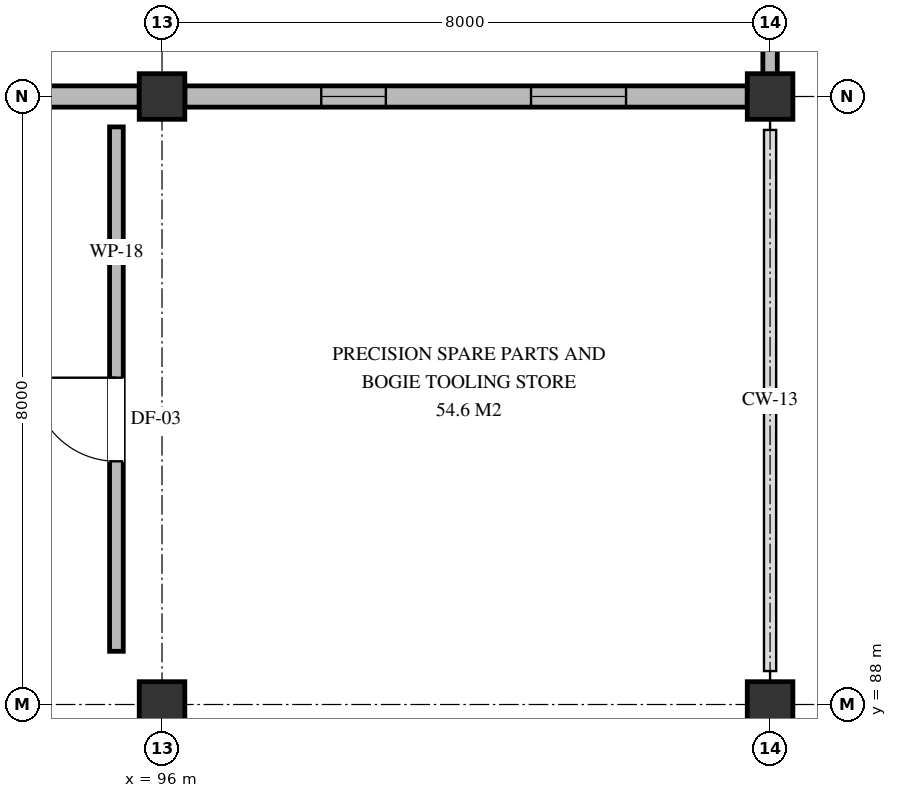
"""IFC4 building model, lengths in metres.
Left out: names, types, materials, properties, quantities, classifications, styles, units other than length and angle.
Written with IfcOpenShell. Run it as: python <this file> out.ifc"""

import sys

from ifc_helpers import new_model, si_unit, direction, frame, frame_2d, origin, origin_2d, place, context, subcontext, project, spatial, polyline, rectangle, outline, extrude, element, fill, save


model = new_model("IFC4")
c1 = context("Model", 3, precision=1e-05, world=origin(), true_north=direction((0.0, 1.0)))
c2 = subcontext(c1, "Body", "Model", "MODEL_VIEW")
j1 = project(units=[si_unit("LENGTHUNIT", "METRE"), si_unit("PLANEANGLEUNIT", "RADIAN")], contexts=[c1])
p1 = place(None, origin())
s1 = spatial("IfcSite", under=j1, at=p1, CompositionType="ELEMENT")
p2 = place(p1, origin())
s2 = spatial("IfcBuilding", under=s1, at=p2, CompositionType="ELEMENT")
p3 = place(p2, frame((0.0, 0.0, 4.8)))
s3 = spatial("IfcBuildingStorey", under=s2, at=p3, CompositionType="ELEMENT", Elevation=4.8)
for number, where, z_axis, x_axis in (
    (1, (96.0, 88.0, 0.0), (0.0, 0.0, 1.0), (1.0, 0.0, 0.0)),
    (2, (96.0, 96.0, 0.0), (0.0, 0.0, 1.0), (1.0, 0.0, 0.0)),
    (3, (104.0, 88.0, 0.0), (0.0, 0.0, 1.0), (1.0, 0.0, 0.0)),
    (4, (104.0, 96.0, 0.0), (0.0, 0.0, 1.0), (1.0, 0.0, 0.0)),
):
    element("IfcColumn", number, at=place(p3, frame(where, z_axis=z_axis, x_axis=x_axis)), inside=s3, PredefinedType="COLUMN", context=c2, shape_type="SweptSolid", body=[
        extrude(rectangle(XDim=0.6, YDim=0.6, at=origin_2d()), origin(), (0.0, 0.0, 1.0), 4.8),
    ])
p4 = place(p3, frame((80.3, 96.0, 0.0), z_axis=(0.0, 0.0, 1.0), x_axis=(1.0, 0.0, 0.0)))
e5 = element("IfcWall", 5, at=p4, inside=s3, PredefinedType="STANDARD", context=c2, shape_type="SweptSolid", body=[
    extrude(rectangle(XDim=15.4, YDim=0.28, at=frame_2d((7.7, 0.0))), origin(), (0.0, 0.0, 1.0), 3.6),
])
p5 = place(p4, frame((3.146, 0.0, 0.78)))
e6 = element("IfcOpeningElement", 6, at=p5, cuts=e5, PredefinedType="OPENING", context=c2, shape_type="SweptSolid", body=[
    extrude(rectangle(XDim=1.1, YDim=2.2, at=frame_2d((0.55, 1.1))), frame((0.0, 0.15, 0.0), z_axis=(0.0, -1.0, 0.0), x_axis=(1.0, 0.0, 0.0)), (0.0, 0.0, 1.0), 0.3),
])
p6 = place(p4, frame((7.2, 0.0, 0.78)))
e7 = element("IfcOpeningElement", 7, at=p6, cuts=e5, PredefinedType="OPENING", context=c2, shape_type="SweptSolid", body=[
    extrude(rectangle(XDim=1.0, YDim=1.9, at=frame_2d((0.5, 0.95))), frame((0.0, 0.15, 0.0), z_axis=(0.0, -1.0, 0.0), x_axis=(1.0, 0.0, 0.0)), (0.0, 0.0, 1.0), 0.3),
])
p7 = place(p4, frame((11.229, 0.0, 0.78)))
e8 = element("IfcOpeningElement", 8, at=p7, cuts=e5, PredefinedType="OPENING", context=c2, shape_type="SweptSolid", body=[
    extrude(rectangle(XDim=0.95, YDim=2.6, at=frame_2d((0.475, 1.3))), frame((0.0, 0.15, 0.0), z_axis=(0.0, -1.0, 0.0), x_axis=(1.0, 0.0, 0.0)), (0.0, 0.0, 1.0), 0.3),
])
p8 = place(p3, frame((96.3, 96.0, 0.0), z_axis=(0.0, 0.0, 1.0), x_axis=(1.0, 0.0, 0.0)))
e9 = element("IfcWall", 9, at=p8, inside=s3, PredefinedType="STANDARD", context=c2, shape_type="SweptSolid", body=[
    extrude(rectangle(XDim=7.4, YDim=0.28, at=frame_2d((3.7, 0.0))), origin(), (0.0, 0.0, 1.0), 3.85),
])
p9 = place(p8, frame((1.795, 0.0, 0.78)))
e10 = element("IfcOpeningElement", 10, at=p9, cuts=e9, PredefinedType="OPENING", context=c2, shape_type="SweptSolid", body=[
    extrude(rectangle(XDim=0.85, YDim=2.4, at=frame_2d((0.425, 1.2))), frame((0.0, 0.15, 0.0), z_axis=(0.0, -1.0, 0.0), x_axis=(1.0, 0.0, 0.0)), (0.0, 0.0, 1.0), 0.3),
])
p10 = place(p8, frame((4.555, 0.0, 0.78)))
e11 = element("IfcOpeningElement", 11, at=p10, cuts=e9, PredefinedType="OPENING", context=c2, shape_type="SweptSolid", body=[
    extrude(rectangle(XDim=1.25, YDim=2.15, at=frame_2d((0.625, 1.075))), frame((0.0, 0.15, 0.0), z_axis=(0.0, -1.0, 0.0), x_axis=(1.0, 0.0, 0.0)), (0.0, 0.0, 1.0), 0.3),
])
p11 = place(p3, frame((104.0, 116.0, 0.06), z_axis=(0.0, 0.0, 1.0), x_axis=(0.0, -1.0, 0.0)))
e12 = element("IfcWall", 12, at=p11, inside=s3, PredefinedType="PARAPET", context=c2, shape_type="SweptSolid", body=[
    extrude(outline(polyline([(0.0, 0.0), (19.8, 0.0), (19.8, 1.49), (18.701, 1.49), (18.691, 0.94), (16.959, 0.94), (16.949, 1.49), (15.84, 1.49), (15.83, 1.49), (14.741, 1.49), (14.731, 0.94), (12.999, 0.94), (12.989, 1.49), (11.88, 1.49), (11.87, 1.49), (10.781, 1.49), (10.771, 0.94), (9.039, 0.94), (9.029, 1.49), (7.92, 1.49), (7.91, 1.49), (6.821, 1.49), (6.811, 0.94), (5.079, 0.94), (5.069, 1.49), (3.96, 1.49), (3.95, 1.49), (2.861, 1.49), (2.851, 0.94), (1.119, 0.94), (1.109, 1.49), (0.0, 1.49), (0.0, 0.0)])), frame((0.0, 0.095, 0.0), z_axis=(0.0, -1.0, 0.0), x_axis=(1.0, 0.0, 0.0)), (0.0, 0.0, 1.0), 0.19),
])
p12 = place(p3, frame((95.4, 88.7, 0.0), z_axis=(0.0, 0.0, 1.0), x_axis=(0.0, 1.0, 0.0)))
e13 = element("IfcWall", 13, at=p12, inside=s3, PredefinedType="PARTITIONING", context=c2, shape_type="SweptSolid", body=[
    extrude(rectangle(XDim=6.9, YDim=0.18, at=frame_2d((3.45, 0.0))), origin(), (0.0, 0.0, 1.0), 3.592),
])
p13 = place(p12, frame((2.5, 0.0, 0.0)))
e14 = element("IfcOpeningElement", 14, at=p13, cuts=e13, PredefinedType="OPENING", context=c2, shape_type="SweptSolid", body=[
    extrude(rectangle(XDim=1.1, YDim=2.2, at=frame_2d((0.55, 1.1))), frame((0.0, 0.1, 0.0), z_axis=(0.0, -1.0, 0.0), x_axis=(1.0, 0.0, 0.0)), (0.0, 0.0, 1.0), 0.2),
])
p14 = place(p9, origin())
e15 = element("IfcWindow", 15, at=p14, inside=s3, PartitioningType="SINGLE_PANEL", PredefinedType="WINDOW", context=c2, shape_type="SweptSolid", body=[
    extrude(rectangle(XDim=0.85, YDim=2.4, at=frame_2d((0.425, 1.2))), frame((0.0, 0.03, 0.0), z_axis=(0.0, -1.0, 0.0), x_axis=(1.0, 0.0, 0.0)), (0.0, 0.0, 1.0), 0.06),
])
fill(e10, e15)
p15 = place(p10, origin())
e16 = element("IfcWindow", 16, at=p15, inside=s3, PartitioningType="SINGLE_PANEL", PredefinedType="WINDOW", context=c2, shape_type="SweptSolid", body=[
    extrude(rectangle(XDim=1.25, YDim=2.15, at=frame_2d((0.625, 1.075))), frame((0.0, 0.03, 0.0), z_axis=(0.0, -1.0, 0.0), x_axis=(1.0, 0.0, 0.0)), (0.0, 0.0, 1.0), 0.06),
])
fill(e11, e16)
p16 = place(p13, origin())
e17 = element("IfcDoor", 17, at=p16, inside=s3, OperationType="SINGLE_SWING_RIGHT", PredefinedType="DOOR", context=c2, shape_type="SweptSolid", body=[
    extrude(rectangle(XDim=1.1, YDim=2.2, at=frame_2d((0.55, 1.1))), frame((0.0, 0.025, 0.0), z_axis=(0.0, -1.0, 0.0), x_axis=(1.0, 0.0, 0.0)), (0.0, 0.0, 1.0), 0.05),
])
fill(e14, e17)
save(model, sys.argv[1])
